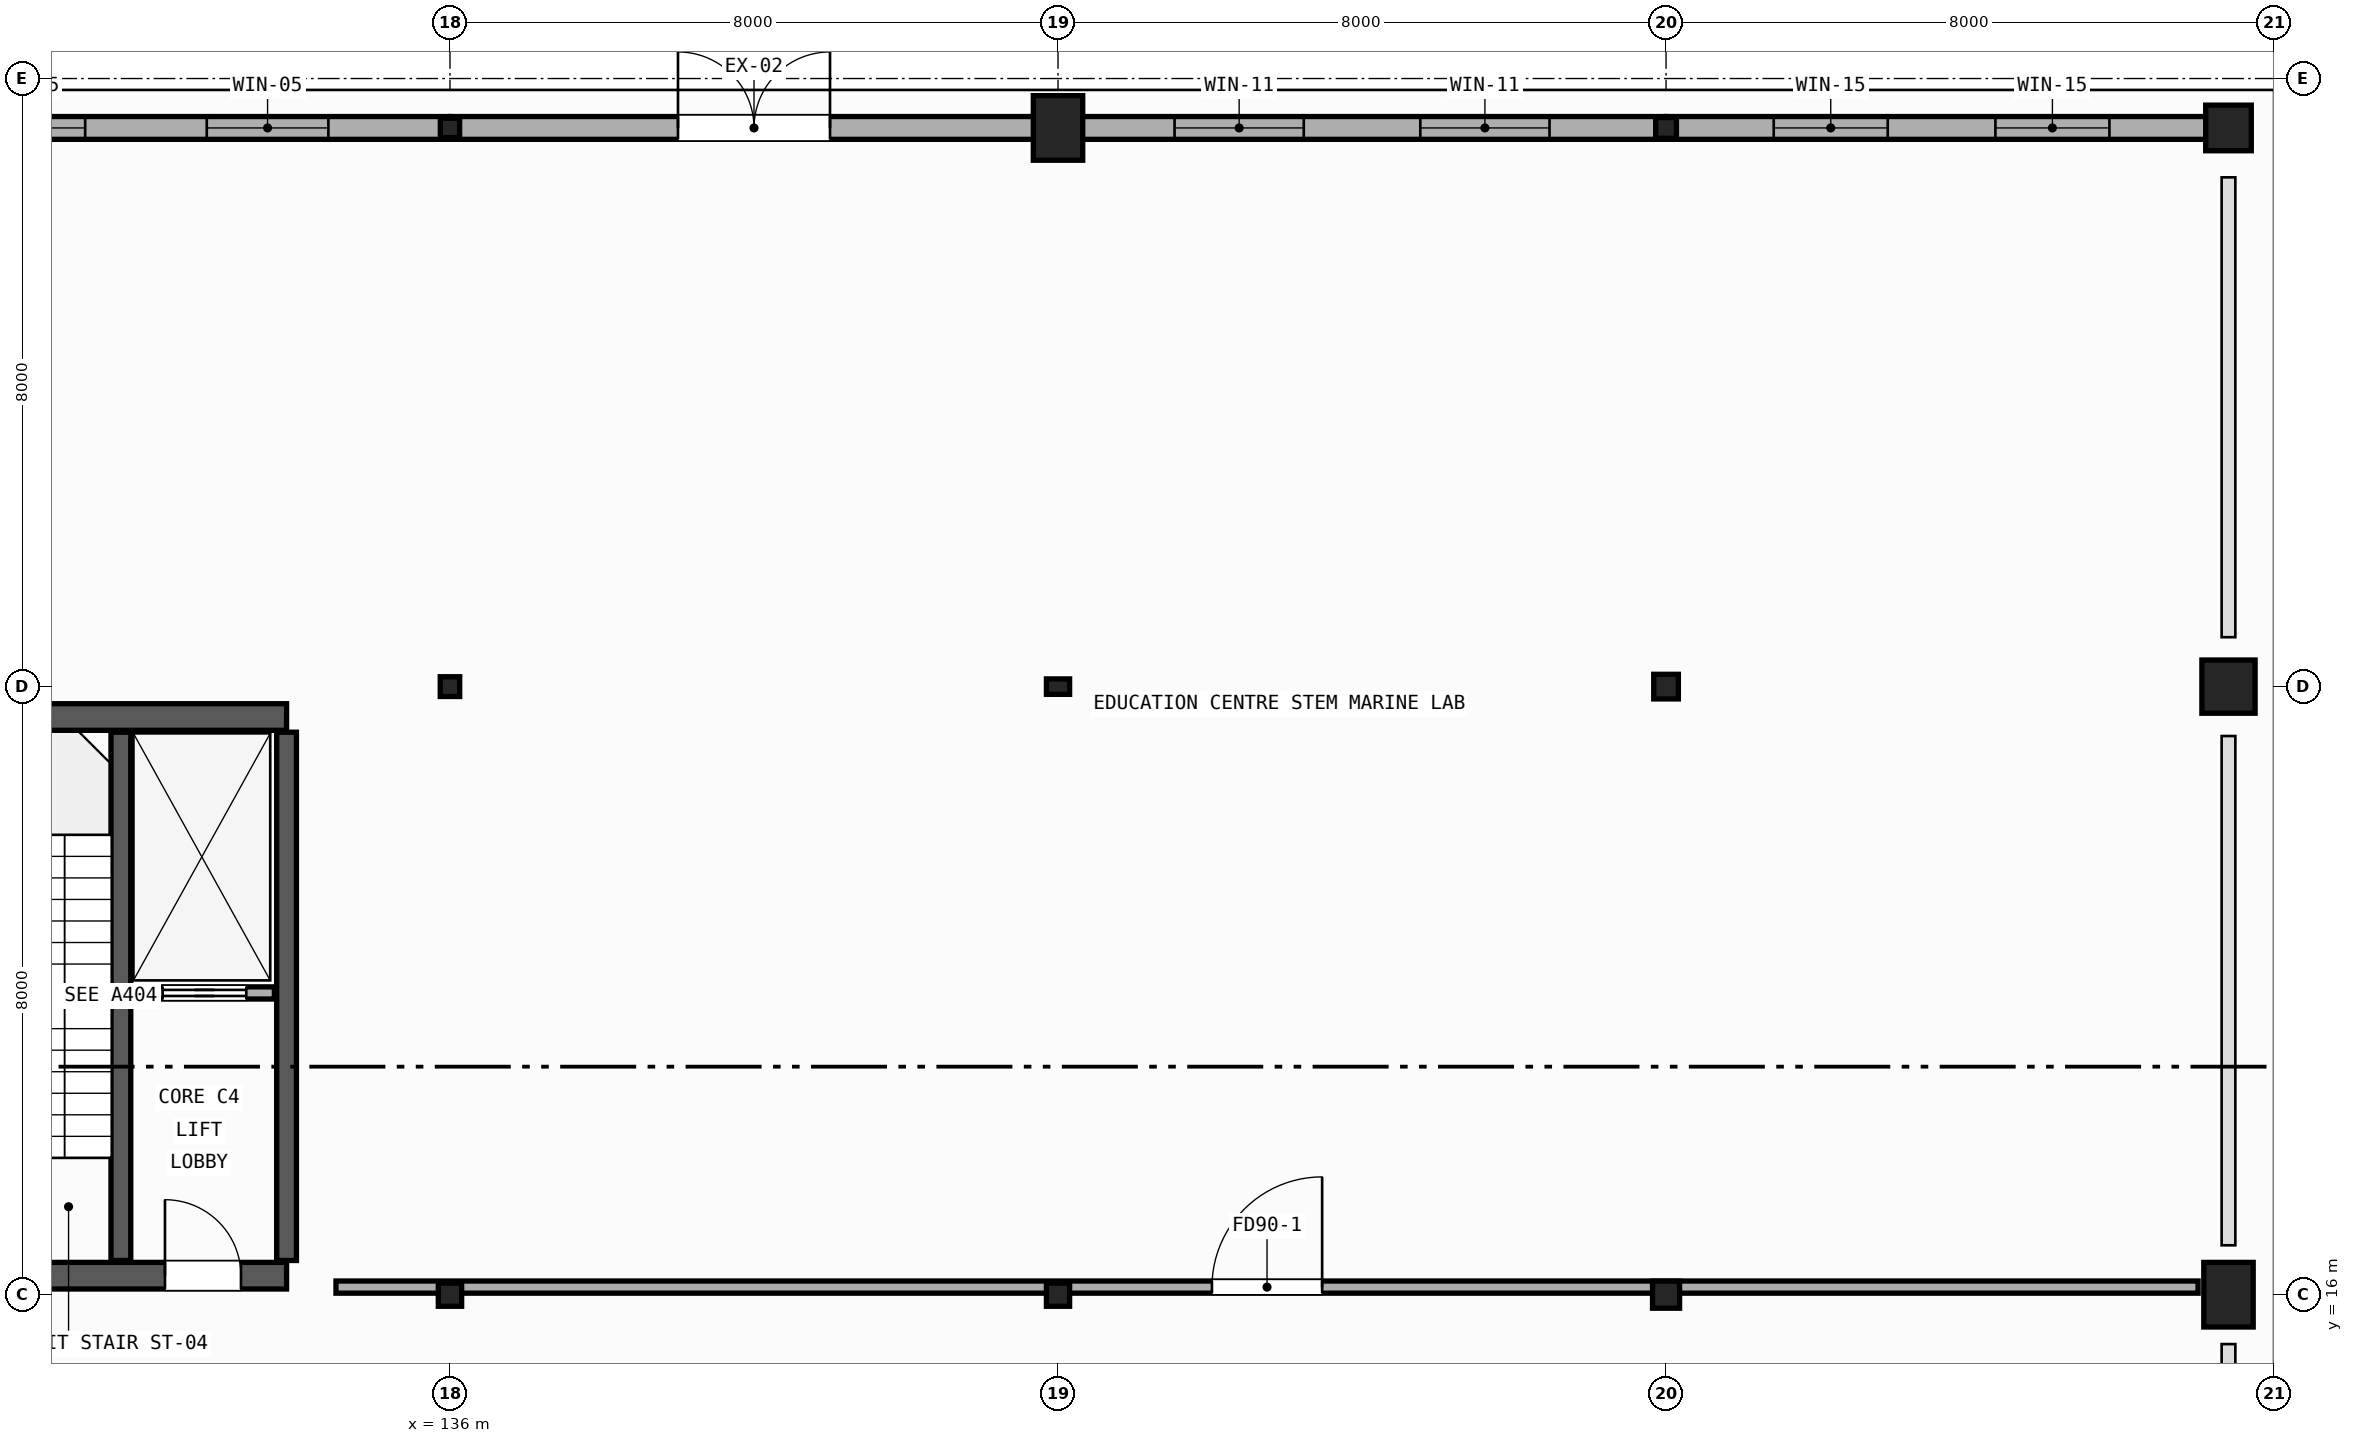
"""IFC4 building model, lengths in metres.
Left out: names, types, materials, properties, quantities, classifications, styles, units other than length and angle.
Written with IfcOpenShell. Run it as: python <this file> out.ifc"""

import sys

from ifc_helpers import new_model, si_unit, direction, frame, frame_2d, origin, origin_2d, place, context, subcontext, project, spatial, rectangle, hollow_rectangle, hollow_circle, i_section, extrude, element, fill, save


model = new_model("IFC4")
c1 = context("Model", 3, precision=1e-05, world=origin(), true_north=direction((0.0, 1.0)))
c2 = subcontext(c1, "Body", "Model", "MODEL_VIEW")
j1 = project(units=[si_unit("LENGTHUNIT", "METRE"), si_unit("PLANEANGLEUNIT", "RADIAN")], contexts=[c1])
p1 = place(None, origin())
s1 = spatial("IfcSite", under=j1, at=p1, CompositionType="ELEMENT")
p2 = place(p1, origin())
s2 = spatial("IfcBuilding", under=s1, at=p2, CompositionType="ELEMENT")
p3 = place(p2, origin())
s3 = spatial("IfcBuildingStorey", under=s2, at=p3, CompositionType="ELEMENT", Elevation=0.0)
p4 = place(p3, frame((136.0, 16.0, 0.0), z_axis=(0.0, 0.0, 1.0), x_axis=(0.0, 1.0, 0.0)))
e1 = element("IfcColumn", 1, at=p4, inside=s3, PredefinedType="COLUMN", context=c2, shape_type="SweptSolid", body=[
    extrude(i_section(OverallWidth=0.305, OverallDepth=0.307, WebThickness=0.01, FlangeThickness=0.015, FilletRadius=0.013, at=origin_2d()), origin(), (0.0, 0.0, 1.0), 5.12),
])
p5 = place(p3, frame((136.0, 24.0, 0.0), z_axis=(0.0, 0.0, 1.0), x_axis=(1.0, 0.0, 0.0)))
e2 = element("IfcColumn", 2, at=p5, inside=s3, PredefinedType="COLUMN", context=c2, shape_type="SweptSolid", body=[
    extrude(i_section(OverallWidth=0.256, OverallDepth=0.26, WebThickness=0.011, FlangeThickness=0.017, FilletRadius=0.011, at=origin_2d()), origin(), (0.0, 0.0, 1.0), 5.12),
])
p6 = place(p3, frame((136.0, 31.35, 0.0), z_axis=(0.0, 0.0, 1.0), x_axis=(0.0, 1.0, 0.0)))
e3 = element("IfcColumn", 3, at=p6, inside=s3, PredefinedType="COLUMN", context=c2, shape_type="SweptSolid", body=[
    extrude(i_section(OverallWidth=0.254, OverallDepth=0.254, WebThickness=0.009, FlangeThickness=0.014, FilletRadius=0.011, at=origin_2d()), origin(), (0.0, 0.0, 1.0), 5.12),
])
p7 = place(p3, frame((144.0, 16.0, 0.0), z_axis=(0.0, 0.0, 1.0), x_axis=(1.0, 0.0, 0.0)))
e4 = element("IfcColumn", 4, at=p7, inside=s3, PredefinedType="COLUMN", context=c2, shape_type="SweptSolid", body=[
    extrude(hollow_rectangle(XDim=0.305, YDim=0.305, WallThickness=0.012, InnerFilletRadius=0.012, OuterFilletRadius=0.024, at=origin_2d()), origin(), (0.0, 0.0, 1.0), 5.12),
])
p8 = place(p3, frame((144.0, 24.0, 0.0), z_axis=(0.0, 0.0, 1.0), x_axis=(0.0, 1.0, 0.0)))
e5 = element("IfcColumn", 5, at=p8, inside=s3, PredefinedType="COLUMN", context=c2, shape_type="SweptSolid", body=[
    extrude(hollow_rectangle(XDim=0.203, YDim=0.305, WallThickness=0.009, InnerFilletRadius=0.009, OuterFilletRadius=0.018, at=origin_2d()), origin(), (0.0, 0.0, 1.0), 5.12),
])
p9 = place(p3, frame((144.0, 31.35, 0.0), z_axis=(0.0, 0.0, 1.0), x_axis=(1.0, 0.0, 0.0)))
e6 = element("IfcColumn", 6, at=p9, inside=s3, PredefinedType="PILASTER", context=c2, shape_type="SweptSolid", body=[
    extrude(rectangle(XDim=0.65, YDim=0.85, at=origin_2d()), origin(), (0.0, 0.0, 1.0), 5.12),
])
p10 = place(p3, frame((152.0, 16.0, 0.0), z_axis=(0.0, 0.0, 1.0), x_axis=(0.0, 1.0, 0.0)))
e7 = element("IfcColumn", 7, at=p10, inside=s3, PredefinedType="COLUMN", context=c2, shape_type="SweptSolid", body=[
    extrude(hollow_circle(Radius=0.178, WallThickness=0.012, at=origin_2d()), origin(), (0.0, 0.0, 1.0), 5.12),
])
p11 = place(p3, frame((152.0, 24.0, 0.0), z_axis=(0.0, 0.0, 1.0), x_axis=(1.0, 0.0, 0.0)))
e8 = element("IfcColumn", 8, at=p11, inside=s3, PredefinedType="COLUMN", context=c2, shape_type="SweptSolid", body=[
    extrude(hollow_circle(Radius=0.162, WallThickness=0.012, at=origin_2d()), origin(), (0.0, 0.0, 1.0), 5.12),
])
p12 = place(p3, frame((152.0, 31.35, 0.0), z_axis=(0.0, 0.0, 1.0), x_axis=(0.0, 1.0, 0.0)))
e9 = element("IfcColumn", 9, at=p12, inside=s3, PredefinedType="COLUMN", context=c2, shape_type="SweptSolid", body=[
    extrude(hollow_circle(Radius=0.136, WallThickness=0.012, at=origin_2d()), origin(), (0.0, 0.0, 1.0), 5.12),
])
p13 = place(p3, frame((159.4, 16.0, 0.0), z_axis=(0.0, 0.0, 1.0), x_axis=(1.0, 0.0, 0.0)))
e10 = element("IfcColumn", 10, at=p13, inside=s3, PredefinedType="PILASTER", context=c2, shape_type="SweptSolid", body=[
    extrude(rectangle(XDim=0.65, YDim=0.85, at=origin_2d()), origin(), (0.0, 0.0, 1.0), 5.12),
])
p14 = place(p3, frame((159.4, 24.0, 0.0), z_axis=(0.0, 0.0, 1.0), x_axis=(0.0, 1.0, 0.0)))
e11 = element("IfcColumn", 11, at=p14, inside=s3, PredefinedType="COLUMN", context=c2, shape_type="SweptSolid", body=[
    extrude(rectangle(XDim=0.7, YDim=0.7, at=origin_2d()), origin(), (0.0, 0.0, 1.0), 5.12),
])
p15 = place(p3, frame((159.4, 31.35, 0.0), z_axis=(0.0, 0.0, 1.0), x_axis=(1.0, 0.0, 0.0)))
e12 = element("IfcColumn", 12, at=p15, inside=s3, PredefinedType="COLUMN", context=c2, shape_type="SweptSolid", body=[
    extrude(rectangle(XDim=0.6, YDim=0.6, at=origin_2d()), origin(), (0.0, 0.0, 1.0), 5.12),
])
p16 = place(p3, frame((128.0, 31.35, 0.0), z_axis=(0.0, 0.0, 1.0), x_axis=(1.0, 0.0, 0.0)))
e13 = element("IfcWall", 13, at=p16, inside=s3, PredefinedType="STANDARD", context=c2, shape_type="SweptSolid", body=[
    extrude(rectangle(XDim=8.0, YDim=0.3, at=frame_2d((4.0, 0.0))), origin(), (0.0, 0.0, 1.0), 4.28),
])
p17 = place(p16, frame((1.6, 0.0, 0.95)))
e14 = element("IfcOpeningElement", 14, at=p17, cuts=e13, PredefinedType="OPENING", context=c2, shape_type="SweptSolid", body=[
    extrude(rectangle(XDim=1.6, YDim=2.3, at=frame_2d((0.8, 1.15))), frame((0.0, 0.16, 0.0), z_axis=(0.0, -1.0, 0.0), x_axis=(1.0, 0.0, 0.0)), (0.0, 0.0, 1.0), 0.32),
])
p18 = place(p16, frame((4.8, 0.0, 0.95)))
e15 = element("IfcOpeningElement", 15, at=p18, cuts=e13, PredefinedType="OPENING", context=c2, shape_type="SweptSolid", body=[
    extrude(rectangle(XDim=1.6, YDim=2.3, at=frame_2d((0.8, 1.15))), frame((0.0, 0.16, 0.0), z_axis=(0.0, -1.0, 0.0), x_axis=(1.0, 0.0, 0.0)), (0.0, 0.0, 1.0), 0.32),
])
p19 = place(p3, frame((136.0, 31.35, 0.0), z_axis=(0.0, 0.0, 1.0), x_axis=(1.0, 0.0, 0.0)))
e16 = element("IfcWall", 16, at=p19, inside=s3, PredefinedType="STANDARD", context=c2, shape_type="SweptSolid", body=[
    extrude(rectangle(XDim=8.0, YDim=0.3, at=frame_2d((4.0, 0.0))), origin(), (0.0, 0.0, 1.0), 4.28),
])
p20 = place(p19, frame((3.0, 0.0, 0.0)))
e17 = element("IfcOpeningElement", 17, at=p20, cuts=e16, PredefinedType="OPENING", context=c2, shape_type="SweptSolid", body=[
    extrude(rectangle(XDim=2.0, YDim=2.5, at=frame_2d((1.0, 1.25))), frame((0.0, 0.16, 0.0), z_axis=(0.0, -1.0, 0.0), x_axis=(1.0, 0.0, 0.0)), (0.0, 0.0, 1.0), 0.32),
])
p21 = place(p3, frame((144.0, 31.35, 0.0), z_axis=(0.0, 0.0, 1.0), x_axis=(1.0, 0.0, 0.0)))
e18 = element("IfcWall", 18, at=p21, inside=s3, PredefinedType="STANDARD", context=c2, shape_type="SweptSolid", body=[
    extrude(rectangle(XDim=8.0, YDim=0.3, at=frame_2d((4.0, 0.0))), origin(), (0.0, 0.0, 1.0), 4.28),
])
p22 = place(p21, frame((1.533, 0.0, 1.05)))
e19 = element("IfcOpeningElement", 19, at=p22, cuts=e18, PredefinedType="OPENING", context=c2, shape_type="SweptSolid", body=[
    extrude(rectangle(XDim=1.7, YDim=1.8, at=frame_2d((0.85, 0.9))), frame((0.0, 0.16, 0.0), z_axis=(0.0, -1.0, 0.0), x_axis=(1.0, 0.0, 0.0)), (0.0, 0.0, 1.0), 0.32),
])
p23 = place(p21, frame((4.767, 0.0, 1.05)))
e20 = element("IfcOpeningElement", 20, at=p23, cuts=e18, PredefinedType="OPENING", context=c2, shape_type="SweptSolid", body=[
    extrude(rectangle(XDim=1.7, YDim=1.8, at=frame_2d((0.85, 0.9))), frame((0.0, 0.16, 0.0), z_axis=(0.0, -1.0, 0.0), x_axis=(1.0, 0.0, 0.0)), (0.0, 0.0, 1.0), 0.32),
])
p24 = place(p3, frame((152.0, 31.35, 0.0), z_axis=(0.0, 0.0, 1.0), x_axis=(1.0, 0.0, 0.0)))
e21 = element("IfcWall", 21, at=p24, inside=s3, PredefinedType="STANDARD", context=c2, shape_type="SweptSolid", body=[
    extrude(rectangle(XDim=7.25, YDim=0.3, at=frame_2d((3.625, 0.0))), origin(), (0.0, 0.0, 1.0), 4.402),
])
p25 = place(p24, frame((1.417, 0.0, 2.35)))
e22 = element("IfcOpeningElement", 22, at=p25, cuts=e21, PredefinedType="OPENING", context=c2, shape_type="SweptSolid", body=[
    extrude(rectangle(XDim=1.5, YDim=1.0, at=frame_2d((0.75, 0.5))), frame((0.0, 0.16, 0.0), z_axis=(0.0, -1.0, 0.0), x_axis=(1.0, 0.0, 0.0)), (0.0, 0.0, 1.0), 0.32),
])
p26 = place(p24, frame((4.333, 0.0, 2.35)))
e23 = element("IfcOpeningElement", 23, at=p26, cuts=e21, PredefinedType="OPENING", context=c2, shape_type="SweptSolid", body=[
    extrude(rectangle(XDim=1.5, YDim=1.0, at=frame_2d((0.75, 0.5))), frame((0.0, 0.16, 0.0), z_axis=(0.0, -1.0, 0.0), x_axis=(1.0, 0.0, 0.0)), (0.0, 0.0, 1.0), 0.32),
])
p27 = place(p3, frame((128.0, 16.25, 0.0), z_axis=(0.0, 0.0, 1.0), x_axis=(1.0, 0.0, 0.0)))
e24 = element("IfcWall", 24, at=p27, inside=s3, PredefinedType="SHEAR", context=c2, shape_type="SweptSolid", body=[
    extrude(rectangle(XDim=5.85, YDim=0.35, at=frame_2d((2.925, 0.0))), origin(), (0.0, 0.0, 1.0), 5.11),
])
p28 = place(p27, frame((1.4, 0.0, 0.0)))
e25 = element("IfcOpeningElement", 25, at=p28, cuts=e24, PredefinedType="OPENING", context=c2, shape_type="SweptSolid", body=[
    extrude(rectangle(XDim=1.05, YDim=2.1, at=frame_2d((0.525, 1.05))), frame((0.0, 0.185, 0.0), z_axis=(0.0, -1.0, 0.0), x_axis=(1.0, 0.0, 0.0)), (0.0, 0.0, 1.0), 0.37),
])
p29 = place(p27, frame((4.25, 0.0, 0.0)))
e26 = element("IfcOpeningElement", 26, at=p29, cuts=e24, PredefinedType="OPENING", context=c2, shape_type="SweptSolid", body=[
    extrude(rectangle(XDim=1.0, YDim=2.15, at=frame_2d((0.5, 1.075))), frame((0.0, 0.185, 0.0), z_axis=(0.0, -1.0, 0.0), x_axis=(1.0, 0.0, 0.0)), (0.0, 0.0, 1.0), 0.37),
])
p30 = place(p3, frame((128.0, 23.6, 0.0), z_axis=(0.0, 0.0, 1.0), x_axis=(1.0, 0.0, 0.0)))
e27 = element("IfcWall", 27, at=p30, inside=s3, PredefinedType="SHEAR", context=c2, shape_type="SweptSolid", body=[
    extrude(rectangle(XDim=5.85, YDim=0.35, at=frame_2d((2.925, 0.0))), origin(), (0.0, 0.0, 1.0), 5.11),
])
for number, where, z_axis, x_axis in (
    (28, (133.85, 16.45, 0.0), (0.0, 0.0, 1.0), (0.0, 1.0, 0.0)),
    (29, (131.67, 16.45, 0.0), (0.0, 0.0, 1.0), (0.0, 1.0, 0.0)),
):
    element("IfcWall", number, at=place(p3, frame(where, z_axis=z_axis, x_axis=x_axis)), inside=s3, PredefinedType="SHEAR", context=c2, shape_type="SweptSolid", body=[
        extrude(rectangle(XDim=6.95, YDim=0.26, at=frame_2d((3.475, 0.0))), origin(), (0.0, 0.0, 1.0), 5.11),
    ])
p31 = place(p3, frame((131.85, 19.97, 0.0), z_axis=(0.0, 0.0, 1.0), x_axis=(1.0, 0.0, 0.0)))
e30 = element("IfcWall", 30, at=p31, inside=s3, PredefinedType="PARTITIONING", context=c2, shape_type="SweptSolid", body=[
    extrude(rectangle(XDim=1.84, YDim=0.16, at=frame_2d((0.92, 0.0))), origin(), (0.0, 0.0, 1.0), 3.6),
])
p32 = place(p31, frame((0.37, 0.0, 0.0)))
e31 = element("IfcOpeningElement", 31, at=p32, cuts=e30, PredefinedType="OPENING", context=c2, shape_type="SweptSolid", body=[
    extrude(rectangle(XDim=1.1, YDim=2.15, at=frame_2d((0.55, 1.075))), frame((0.0, 0.09, 0.0), z_axis=(0.0, -1.0, 0.0), x_axis=(1.0, 0.0, 0.0)), (0.0, 0.0, 1.0), 0.18),
])
p33 = place(p3, frame((134.5, 16.1, 0.0), z_axis=(0.0, 0.0, 1.0), x_axis=(1.0, 0.0, 0.0)))
e32 = element("IfcWall", 32, at=p33, inside=s3, PredefinedType="PARTITIONING", context=c2, shape_type="SweptSolid", body=[
    extrude(rectangle(XDim=24.5, YDim=0.16, at=frame_2d((12.25, 0.0))), origin(), (0.0, 0.0, 1.0), 4.29),
])
p34 = place(p33, frame((11.525, 0.0, 0.0)))
e33 = element("IfcOpeningElement", 33, at=p34, cuts=e32, PredefinedType="OPENING", context=c2, shape_type="SweptSolid", body=[
    extrude(rectangle(XDim=1.45, YDim=2.25, at=frame_2d((0.725, 1.125))), frame((0.0, 0.09, 0.0), z_axis=(0.0, -1.0, 0.0), x_axis=(1.0, 0.0, 0.0)), (0.0, 0.0, 1.0), 0.18),
])
p35 = place(p17, origin())
e34 = element("IfcWindow", 34, at=p35, inside=s3, PartitioningType="SINGLE_PANEL", PredefinedType="WINDOW", context=c2, shape_type="SweptSolid", body=[
    extrude(rectangle(XDim=1.6, YDim=2.3, at=frame_2d((0.8, 1.15))), frame((0.0, 0.03, 0.0), z_axis=(0.0, -1.0, 0.0), x_axis=(1.0, 0.0, 0.0)), (0.0, 0.0, 1.0), 0.06),
])
fill(e14, e34)
p36 = place(p18, origin())
e35 = element("IfcWindow", 35, at=p36, inside=s3, PartitioningType="SINGLE_PANEL", PredefinedType="WINDOW", context=c2, shape_type="SweptSolid", body=[
    extrude(rectangle(XDim=1.6, YDim=2.3, at=frame_2d((0.8, 1.15))), frame((0.0, 0.03, 0.0), z_axis=(0.0, -1.0, 0.0), x_axis=(1.0, 0.0, 0.0)), (0.0, 0.0, 1.0), 0.06),
])
fill(e15, e35)
p37 = place(p20, origin())
e36 = element("IfcDoor", 36, at=p37, inside=s3, OperationType="DOUBLE_DOOR_SINGLE_SWING", PredefinedType="DOOR", context=c2, shape_type="SweptSolid", body=[
    extrude(rectangle(XDim=2.0, YDim=2.5, at=frame_2d((1.0, 1.25))), frame((0.0, 0.025, 0.0), z_axis=(0.0, -1.0, 0.0), x_axis=(1.0, 0.0, 0.0)), (0.0, 0.0, 1.0), 0.05),
])
fill(e17, e36)
p38 = place(p22, origin())
e37 = element("IfcWindow", 37, at=p38, inside=s3, PartitioningType="SINGLE_PANEL", PredefinedType="WINDOW", context=c2, shape_type="SweptSolid", body=[
    extrude(rectangle(XDim=1.7, YDim=1.8, at=frame_2d((0.85, 0.9))), frame((0.0, 0.03, 0.0), z_axis=(0.0, -1.0, 0.0), x_axis=(1.0, 0.0, 0.0)), (0.0, 0.0, 1.0), 0.06),
])
fill(e19, e37)
p39 = place(p23, origin())
e38 = element("IfcWindow", 38, at=p39, inside=s3, PartitioningType="SINGLE_PANEL", PredefinedType="WINDOW", context=c2, shape_type="SweptSolid", body=[
    extrude(rectangle(XDim=1.7, YDim=1.8, at=frame_2d((0.85, 0.9))), frame((0.0, 0.03, 0.0), z_axis=(0.0, -1.0, 0.0), x_axis=(1.0, 0.0, 0.0)), (0.0, 0.0, 1.0), 0.06),
])
fill(e20, e38)
p40 = place(p25, origin())
e39 = element("IfcWindow", 39, at=p40, inside=s3, PartitioningType="SINGLE_PANEL", PredefinedType="WINDOW", context=c2, shape_type="SweptSolid", body=[
    extrude(rectangle(XDim=1.5, YDim=1.0, at=frame_2d((0.75, 0.5))), frame((0.0, 0.03, 0.0), z_axis=(0.0, -1.0, 0.0), x_axis=(1.0, 0.0, 0.0)), (0.0, 0.0, 1.0), 0.06),
])
fill(e22, e39)
p41 = place(p26, origin())
e40 = element("IfcWindow", 40, at=p41, inside=s3, PartitioningType="SINGLE_PANEL", PredefinedType="WINDOW", context=c2, shape_type="SweptSolid", body=[
    extrude(rectangle(XDim=1.5, YDim=1.0, at=frame_2d((0.75, 0.5))), frame((0.0, 0.03, 0.0), z_axis=(0.0, -1.0, 0.0), x_axis=(1.0, 0.0, 0.0)), (0.0, 0.0, 1.0), 0.06),
])
fill(e23, e40)
p42 = place(p32, origin())
e41 = element("IfcDoor", 41, at=p42, inside=s3, OperationType="SLIDING_TO_LEFT", PredefinedType="DOOR", context=c2, shape_type="SweptSolid", body=[
    extrude(rectangle(XDim=1.1, YDim=2.15, at=frame_2d((0.55, 1.075))), frame((0.0, 0.025, 0.0), z_axis=(0.0, -1.0, 0.0), x_axis=(1.0, 0.0, 0.0)), (0.0, 0.0, 1.0), 0.05),
])
fill(e31, e41)
p43 = place(p29, origin())
e42 = element("IfcDoor", 42, at=p43, inside=s3, OperationType="SINGLE_SWING_LEFT", PredefinedType="DOOR", context=c2, shape_type="SweptSolid", body=[
    extrude(rectangle(XDim=1.0, YDim=2.15, at=frame_2d((0.5, 1.075))), frame((0.0, 0.025, 0.0), z_axis=(0.0, -1.0, 0.0), x_axis=(1.0, 0.0, 0.0)), (0.0, 0.0, 1.0), 0.05),
])
fill(e26, e42)
p44 = place(p34, origin())
e43 = element("IfcDoor", 43, at=p44, inside=s3, OperationType="SINGLE_SWING_RIGHT", PredefinedType="DOOR", context=c2, shape_type="SweptSolid", body=[
    extrude(rectangle(XDim=1.45, YDim=2.25, at=frame_2d((0.725, 1.125))), frame((0.0, 0.025, 0.0), z_axis=(0.0, -1.0, 0.0), x_axis=(1.0, 0.0, 0.0)), (0.0, 0.0, 1.0), 0.05),
])
fill(e33, e43)
save(model, sys.argv[1])
